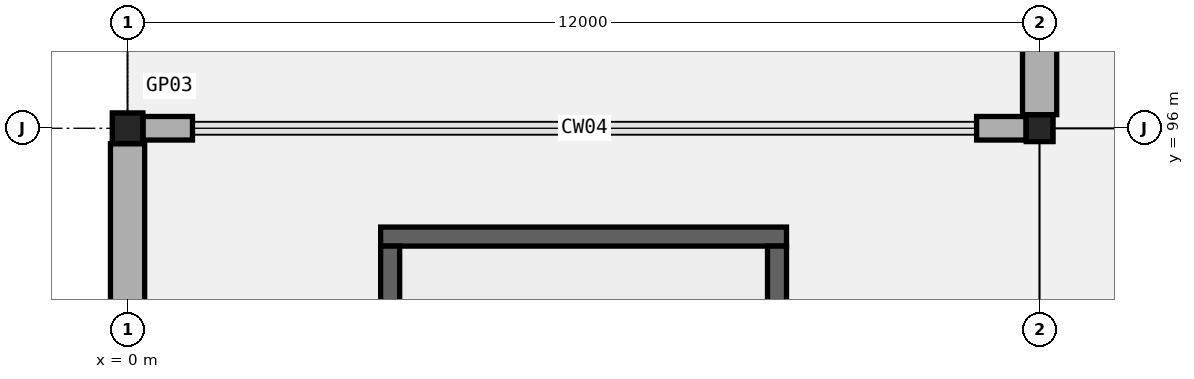
"""IFC4 building model, lengths in metres.
Left out: names, types, materials, properties, quantities, classifications, styles, units other than length and angle.
Written with IfcOpenShell. Run it as: python <this file> out.ifc"""

import sys

from ifc_helpers import new_model, si_unit, direction, frame, frame_2d, origin, origin_2d, place, context, subcontext, project, spatial, rectangle, hollow_rectangle, extrude, element, save


model = new_model("IFC4")
c1 = context("Model", 3, precision=1e-05, world=origin(), true_north=direction((0.0, 1.0)))
c2 = subcontext(c1, "Body", "Model", "MODEL_VIEW")
j1 = project(units=[si_unit("LENGTHUNIT", "METRE"), si_unit("PLANEANGLEUNIT", "RADIAN")], contexts=[c1])
p1 = place(None, origin())
s1 = spatial("IfcSite", under=j1, at=p1, CompositionType="ELEMENT")
p2 = place(p1, origin())
s2 = spatial("IfcBuilding", under=s1, at=p2, CompositionType="ELEMENT")
p3 = place(p2, frame((0.0, 0.0, 20.4)))
s3 = spatial("IfcBuildingStorey", under=s2, at=p3, CompositionType="ELEMENT", Elevation=20.4)
p4 = place(p3, frame((0.0, 96.0, 0.0), z_axis=(0.0, 0.0, 1.0), x_axis=(1.0, 0.0, 0.0)))
e1 = element("IfcColumn", 1, at=p4, inside=s3, PredefinedType="COLUMN", context=c2, shape_type="SweptSolid", body=[
    extrude(hollow_rectangle(XDim=0.4, YDim=0.4, WallThickness=0.016, InnerFilletRadius=0.016, OuterFilletRadius=0.032, at=origin_2d()), origin(), (0.0, 0.0, 1.0), 5.4),
])
p5 = place(p3, frame((12.0, 96.0, 0.0), z_axis=(0.0, 0.0, 1.0), x_axis=(1.0, 0.0, 0.0)))
e2 = element("IfcColumn", 2, at=p5, inside=s3, PredefinedType="COLUMN", context=c2, shape_type="SweptSolid", body=[
    extrude(hollow_rectangle(XDim=0.35, YDim=0.35, WallThickness=0.016, InnerFilletRadius=0.016, OuterFilletRadius=0.032, at=origin_2d()), origin(), (0.0, 0.0, 1.0), 5.4),
])
p6 = place(p3, frame((0.204, 96.0, 0.0), z_axis=(0.0, 0.0, 1.0), x_axis=(1.0, 0.0, 0.0)))
e3 = element("IfcWall", 3, at=p6, inside=s3, PredefinedType="SOLIDWALL", context=c2, shape_type="SweptSolid", body=[
    extrude(rectangle(XDim=0.65, YDim=0.31, at=frame_2d((0.325, 0.0))), origin(), (0.0, 0.0, 1.0), 4.592),
])
p7 = place(p3, frame((11.171, 96.0, 0.0), z_axis=(0.0, 0.0, 1.0), x_axis=(1.0, 0.0, 0.0)))
e4 = element("IfcWall", 4, at=p7, inside=s3, PredefinedType="SOLIDWALL", context=c2, shape_type="SweptSolid", body=[
    extrude(rectangle(XDim=0.65, YDim=0.31, at=frame_2d((0.325, 0.0))), origin(), (0.0, 0.0, 1.0), 4.592),
])
p8 = place(p3, frame((0.0, 84.304, 0.0), z_axis=(0.0, 0.0, 1.0), x_axis=(0.0, 1.0, 0.0)))
e5 = element("IfcWall", 5, at=p8, inside=s3, PredefinedType="SOLIDWALL", context=c2, shape_type="SweptSolid", body=[
    extrude(rectangle(XDim=11.492, YDim=0.45, at=frame_2d((5.746, 0.0))), origin(), (0.0, 0.0, 1.0), 4.58),
])
p9 = place(p8, frame((2.75, 0.0, 0.95)))
e6 = element("IfcOpeningElement", 6, at=p9, cuts=e5, PredefinedType="OPENING", context=c2, shape_type="SweptSolid", body=[
    extrude(rectangle(XDim=1.2, YDim=1.9, at=frame_2d((0.6, 0.95))), frame((0.0, 0.235, 0.0), z_axis=(0.0, -1.0, 0.0), x_axis=(1.0, 0.0, 0.0)), (0.0, 0.0, 1.0), 0.47),
])
p10 = place(p3, frame((12.0, 96.179, 0.0), z_axis=(0.0, 0.0, 1.0), x_axis=(0.0, 1.0, 0.0)))
e7 = element("IfcWall", 7, at=p10, inside=s3, PredefinedType="SOLIDWALL", context=c2, shape_type="SweptSolid", body=[
    extrude(rectangle(XDim=11.667, YDim=0.45, at=frame_2d((5.833, 0.0))), origin(), (0.0, 0.0, 1.0), 4.48),
])
p11 = place(p10, frame((1.5, 0.0, 0.95)))
e8 = element("IfcOpeningElement", 8, at=p11, cuts=e7, PredefinedType="OPENING", context=c2, shape_type="SweptSolid", body=[
    extrude(rectangle(XDim=1.65, YDim=2.45, at=frame_2d((0.825, 1.225))), frame((0.0, 0.235, 0.0), z_axis=(0.0, -1.0, 0.0), x_axis=(1.0, 0.0, 0.0)), (0.0, 0.0, 1.0), 0.47),
])
p12 = place(p3, frame((3.33, 94.575, 0.0), z_axis=(0.0, 0.0, 1.0), x_axis=(1.0, 0.0, 0.0)))
e9 = element("IfcWall", 9, at=p12, inside=s3, PredefinedType="SHEAR", context=c2, shape_type="SweptSolid", body=[
    extrude(rectangle(XDim=5.34, YDim=0.25, at=frame_2d((2.67, 0.0))), origin(), (0.0, 0.0, 1.0), 5.18),
])
for number, where, z_axis, x_axis in (
    (10, (3.455, 85.55, 0.0), (0.0, 0.0, 1.0), (0.0, 1.0, 0.0)),
    (11, (8.545, 85.55, 0.0), (0.0, 0.0, 1.0), (0.0, 1.0, 0.0)),
):
    element("IfcWall", number, at=place(p3, frame(where, z_axis=z_axis, x_axis=x_axis)), inside=s3, PredefinedType="SHEAR", context=c2, shape_type="SweptSolid", body=[
        extrude(rectangle(XDim=8.9, YDim=0.25, at=frame_2d((4.45, 0.0))), origin(), (0.0, 0.0, 1.0), 5.18),
    ])
save(model, sys.argv[1])
